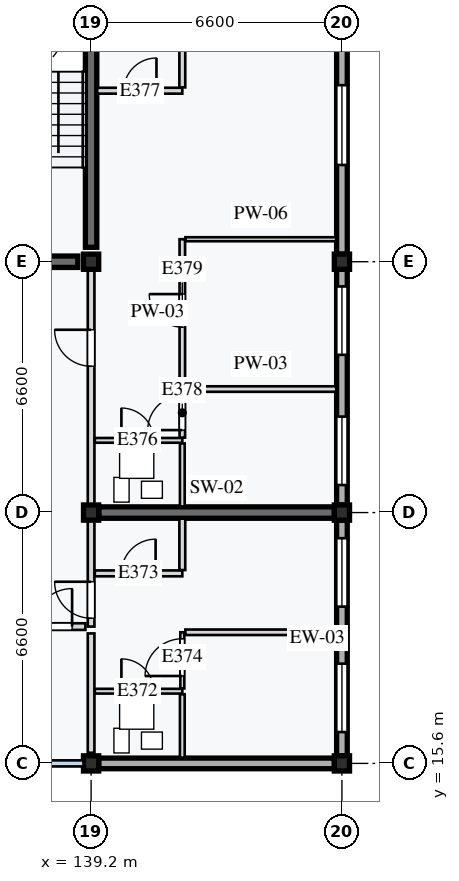
"""IFC4 building model, lengths in metres.
Left out: names, types, materials, properties, quantities, classifications, styles, units other than length and angle.
Written with IfcOpenShell. Run it as: python <this file> out.ifc"""

import sys

from ifc_helpers import new_model, si_unit, direction, frame, frame_2d, origin, origin_2d, place, context, subcontext, project, spatial, rectangle, extrude, element, fill, save


model = new_model("IFC4")
c1 = context("Model", 3, precision=1e-05, world=origin(), true_north=direction((0.0, 1.0)))
c2 = subcontext(c1, "Body", "Model", "MODEL_VIEW")
j1 = project(units=[si_unit("LENGTHUNIT", "METRE"), si_unit("PLANEANGLEUNIT", "RADIAN")], contexts=[c1])
p1 = place(None, origin())
s1 = spatial("IfcSite", under=j1, at=p1, CompositionType="ELEMENT")
p2 = place(p1, origin())
s2 = spatial("IfcBuilding", under=s1, at=p2, CompositionType="ELEMENT")
p3 = place(p2, frame((0.0, 0.0, 30.8)))
s3 = spatial("IfcBuildingStorey", under=s2, at=p3, CompositionType="ELEMENT", Elevation=30.8)
for number, where, z_axis, x_axis in (
    (1, (139.2, 15.6, 0.0), (0.0, 0.0, 1.0), (1.0, 0.0, 0.0)),
    (2, (145.8, 15.6, 0.0), (0.0, 0.0, 1.0), (1.0, 0.0, 0.0)),
    (3, (139.2, 22.2, 0.0), (0.0, 0.0, 1.0), (1.0, 0.0, 0.0)),
    (4, (145.8, 22.2, 0.0), (0.0, 0.0, 1.0), (1.0, 0.0, 0.0)),
    (5, (139.2, 28.8, 0.0), (0.0, 0.0, 1.0), (1.0, 0.0, 0.0)),
    (6, (145.8, 28.8, 0.0), (0.0, 0.0, 1.0), (1.0, 0.0, 0.0)),
):
    element("IfcColumn", number, at=place(p3, frame(where, z_axis=z_axis, x_axis=x_axis)), inside=s3, PredefinedType="COLUMN", context=c2, shape_type="SweptSolid", body=[
        extrude(rectangle(XDim=0.4, YDim=0.4, at=origin_2d()), origin(), (0.0, 0.0, 1.0), 3.2),
    ])
p4 = place(p3, frame((139.2, 29.18, 0.0), z_axis=(0.0, 0.0, 1.0), x_axis=(0.0, 1.0, 0.0)))
e7 = element("IfcWall", 7, at=p4, inside=s3, PredefinedType="SHEAR", context=c2, shape_type="SweptSolid", body=[
    extrude(rectangle(XDim=5.84, YDim=0.3, at=frame_2d((2.92, 0.0))), origin(), (0.0, 0.0, 1.0), 2.97),
])
p5 = place(p3, frame((136.05, 28.8, 0.0), z_axis=(0.0, 0.0, 1.0), x_axis=(1.0, 0.0, 0.0)))
e8 = element("IfcWall", 8, at=p5, inside=s3, PredefinedType="SHEAR", context=c2, shape_type="SweptSolid", body=[
    extrude(rectangle(XDim=2.8, YDim=0.3, at=frame_2d((1.4, 0.0))), origin(), (0.0, 0.0, 1.0), 2.97),
])
p6 = place(p3, frame((139.4, 22.2, 0.0), z_axis=(0.0, 0.0, 1.0), x_axis=(1.0, 0.0, 0.0)))
e9 = element("IfcWall", 9, at=p6, inside=s3, PredefinedType="SHEAR", context=c2, shape_type="SweptSolid", body=[
    extrude(rectangle(XDim=6.2, YDim=0.3, at=frame_2d((3.1, 0.0))), origin(), (0.0, 0.0, 1.0), 2.97),
])
p7 = place(p3, frame((145.8, 15.8, 0.0), z_axis=(0.0, 0.0, 1.0), x_axis=(0.0, 1.0, 0.0)))
e10 = element("IfcWall", 10, at=p7, inside=s3, PredefinedType="STANDARD", context=c2, shape_type="SweptSolid", body=[
    extrude(rectangle(XDim=6.2, YDim=0.28, at=frame_2d((3.1, 0.0))), origin(), (0.0, 0.0, 1.0), 2.6),
])
p8 = place(p7, frame((0.625, 0.0, 0.85)))
e11 = element("IfcOpeningElement", 11, at=p8, cuts=e10, PredefinedType="OPENING", context=c2, shape_type="SweptSolid", body=[
    extrude(rectangle(XDim=1.8, YDim=1.35, at=frame_2d((0.9, 0.675))), frame((0.0, 0.15, 0.0), z_axis=(0.0, -1.0, 0.0), x_axis=(1.0, 0.0, 0.0)), (0.0, 0.0, 1.0), 0.3),
])
p9 = place(p7, frame((3.925, 0.0, 0.85)))
e12 = element("IfcOpeningElement", 12, at=p9, cuts=e10, PredefinedType="OPENING", context=c2, shape_type="SweptSolid", body=[
    extrude(rectangle(XDim=1.8, YDim=1.55, at=frame_2d((0.9, 0.775))), frame((0.0, 0.15, 0.0), z_axis=(0.0, -1.0, 0.0), x_axis=(1.0, 0.0, 0.0)), (0.0, 0.0, 1.0), 0.3),
])
p10 = place(p3, frame((145.8, 22.4, 0.0), z_axis=(0.0, 0.0, 1.0), x_axis=(0.0, 1.0, 0.0)))
e13 = element("IfcWall", 13, at=p10, inside=s3, PredefinedType="STANDARD", context=c2, shape_type="SweptSolid", body=[
    extrude(rectangle(XDim=6.2, YDim=0.28, at=frame_2d((3.1, 0.0))), origin(), (0.0, 0.0, 1.0), 2.6),
])
p11 = place(p10, frame((0.525, 0.0, 0.85)))
e14 = element("IfcOpeningElement", 14, at=p11, cuts=e13, PredefinedType="OPENING", context=c2, shape_type="SweptSolid", body=[
    extrude(rectangle(XDim=1.8, YDim=1.35, at=frame_2d((0.9, 0.675))), frame((0.0, 0.15, 0.0), z_axis=(0.0, -1.0, 0.0), x_axis=(1.0, 0.0, 0.0)), (0.0, 0.0, 1.0), 0.3),
])
p12 = place(p10, frame((3.95, 0.0, 0.85)))
e15 = element("IfcOpeningElement", 15, at=p12, cuts=e13, PredefinedType="OPENING", context=c2, shape_type="SweptSolid", body=[
    extrude(rectangle(XDim=1.8, YDim=1.35, at=frame_2d((0.9, 0.675))), frame((0.0, 0.15, 0.0), z_axis=(0.0, -1.0, 0.0), x_axis=(1.0, 0.0, 0.0)), (0.0, 0.0, 1.0), 0.3),
])
p13 = place(p3, frame((145.8, 29.0, 0.0), z_axis=(0.0, 0.0, 1.0), x_axis=(0.0, 1.0, 0.0)))
e16 = element("IfcWall", 16, at=p13, inside=s3, PredefinedType="STANDARD", context=c2, shape_type="SweptSolid", body=[
    extrude(rectangle(XDim=6.2, YDim=0.28, at=frame_2d((3.1, 0.0))), origin(), (0.0, 0.0, 1.0), 2.6),
])
p14 = place(p13, frame((2.346, 0.0, 0.85)))
e17 = element("IfcOpeningElement", 17, at=p14, cuts=e16, PredefinedType="OPENING", context=c2, shape_type="SweptSolid", body=[
    extrude(rectangle(XDim=2.1, YDim=1.55, at=frame_2d((1.05, 0.775))), frame((0.0, 0.15, 0.0), z_axis=(0.0, -1.0, 0.0), x_axis=(1.0, 0.0, 0.0)), (0.0, 0.0, 1.0), 0.3),
])
p15 = place(p3, frame((139.4, 15.6, 0.0), z_axis=(0.0, 0.0, 1.0), x_axis=(1.0, 0.0, 0.0)))
e18 = element("IfcWall", 18, at=p15, inside=s3, PredefinedType="STANDARD", context=c2, shape_type="SweptSolid", body=[
    extrude(rectangle(XDim=6.2, YDim=0.28, at=frame_2d((3.1, 0.0))), origin(), (0.0, 0.0, 1.0), 2.65),
])
p16 = place(p3, frame((136.05, 19.2, 0.0), z_axis=(0.0, 0.0, 1.0), x_axis=(1.0, 0.0, 0.0)))
e19 = element("IfcWall", 19, at=p16, inside=s3, PredefinedType="PARTITIONING", context=c2, shape_type="SweptSolid", body=[
    extrude(rectangle(XDim=3.0, YDim=0.175, at=frame_2d((1.5, 0.0))), origin(), (0.0, 0.0, 1.0), 2.97),
])
p17 = place(p16, frame((1.65, 0.0, 0.0)))
e20 = element("IfcOpeningElement", 20, at=p17, cuts=e19, PredefinedType="OPENING", context=c2, shape_type="SweptSolid", body=[
    extrude(rectangle(XDim=1.0, YDim=2.16, at=frame_2d((0.5, 1.08))), frame((0.0, 0.097, 0.0), z_axis=(0.0, -1.0, 0.0), x_axis=(1.0, 0.0, 0.0)), (0.0, 0.0, 1.0), 0.195),
])
p18 = place(p3, frame((139.2, 15.88, 0.0), z_axis=(0.0, 0.0, 1.0), x_axis=(0.0, 1.0, 0.0)))
e21 = element("IfcWall", 21, at=p18, inside=s3, PredefinedType="PARTITIONING", context=c2, shape_type="SweptSolid", body=[
    extrude(rectangle(XDim=3.14, YDim=0.175, at=frame_2d((1.57, 0.0))), origin(), (0.0, 0.0, 1.0), 2.55),
])
p19 = place(p3, frame((139.2, 19.2, 0.0), z_axis=(0.0, 0.0, 1.0), x_axis=(0.0, 1.0, 0.0)))
e22 = element("IfcWall", 22, at=p19, inside=s3, PredefinedType="PARTITIONING", context=c2, shape_type="SweptSolid", body=[
    extrude(rectangle(XDim=3.0, YDim=0.175, at=frame_2d((1.5, 0.0))), origin(), (0.0, 0.0, 1.0), 2.55),
])
p20 = place(p19, frame((0.22, 0.0, 0.0)))
e23 = element("IfcOpeningElement", 23, at=p20, cuts=e22, PredefinedType="OPENING", context=c2, shape_type="SweptSolid", body=[
    extrude(rectangle(XDim=0.96, YDim=2.18, at=frame_2d((0.48, 1.09))), frame((0.0, 0.097, 0.0), z_axis=(0.0, -1.0, 0.0), x_axis=(1.0, 0.0, 0.0)), (0.0, 0.0, 1.0), 0.195),
])
p21 = place(p3, frame((139.298, 17.5, 0.0), z_axis=(0.0, 0.0, 1.0), x_axis=(1.0, 0.0, 0.0)))
e24 = element("IfcWall", 24, at=p21, inside=s3, PredefinedType="PARTITIONING", context=c2, shape_type="SweptSolid", body=[
    extrude(rectangle(XDim=2.302, YDim=0.125, at=frame_2d((1.151, 0.0))), origin(), (0.0, 0.0, 1.0), 2.97),
])
p22 = place(p21, frame((0.7, 0.0, 0.0)))
e25 = element("IfcOpeningElement", 25, at=p22, cuts=e24, PredefinedType="OPENING", context=c2, shape_type="SweptSolid", body=[
    extrude(rectangle(XDim=0.85, YDim=2.04, at=frame_2d((0.425, 1.02))), frame((0.0, 0.073, 0.0), z_axis=(0.0, -1.0, 0.0), x_axis=(1.0, 0.0, 0.0)), (0.0, 0.0, 1.0), 0.145),
])
p23 = place(p3, frame((141.6, 15.75, 0.0), z_axis=(0.0, 0.0, 1.0), x_axis=(0.0, 1.0, 0.0)))
e26 = element("IfcWall", 26, at=p23, inside=s3, PredefinedType="PARTITIONING", context=c2, shape_type="SweptSolid", body=[
    extrude(rectangle(XDim=1.67, YDim=0.125, at=frame_2d((0.835, 0.0))), origin(), (0.0, 0.0, 1.0), 2.97),
])
p24 = place(p3, frame((139.298, 20.6, 0.0), z_axis=(0.0, 0.0, 1.0), x_axis=(1.0, 0.0, 0.0)))
e27 = element("IfcWall", 27, at=p24, inside=s3, PredefinedType="PARTITIONING", context=c2, shape_type="SweptSolid", body=[
    extrude(rectangle(XDim=2.302, YDim=0.155, at=frame_2d((1.151, 0.0))), origin(), (0.0, 0.0, 1.0), 2.97),
])
p25 = place(p24, frame((0.7, 0.0, 0.0)))
e28 = element("IfcOpeningElement", 28, at=p25, cuts=e27, PredefinedType="OPENING", context=c2, shape_type="SweptSolid", body=[
    extrude(rectangle(XDim=0.9, YDim=2.16, at=frame_2d((0.45, 1.08))), frame((0.0, 0.087, 0.0), z_axis=(0.0, -1.0, 0.0), x_axis=(1.0, 0.0, 0.0)), (0.0, 0.0, 1.0), 0.175),
])
p26 = place(p3, frame((141.6, 20.688, 0.0), z_axis=(0.0, 0.0, 1.0), x_axis=(0.0, 1.0, 0.0)))
e29 = element("IfcWall", 29, at=p26, inside=s3, PredefinedType="PARTITIONING", context=c2, shape_type="SweptSolid", body=[
    extrude(rectangle(XDim=1.353, YDim=0.155, at=frame_2d((0.676, 0.0))), origin(), (0.0, 0.0, 1.0), 2.97),
])
p27 = place(p3, frame((141.6, 17.573, 0.0), z_axis=(0.0, 0.0, 1.0), x_axis=(0.0, 1.0, 0.0)))
e30 = element("IfcWall", 30, at=p27, inside=s3, PredefinedType="PARTITIONING", context=c2, shape_type="SweptSolid", body=[
    extrude(rectangle(XDim=1.478, YDim=0.105, at=frame_2d((0.739, 0.0))), origin(), (0.0, 0.0, 1.0), 2.97),
])
p28 = place(p27, frame((0.327, 0.0, 0.0)))
e31 = element("IfcOpeningElement", 31, at=p28, cuts=e30, PredefinedType="OPENING", context=c2, shape_type="SweptSolid", body=[
    extrude(rectangle(XDim=0.98, YDim=2.12, at=frame_2d((0.49, 1.06))), frame((0.0, 0.062, 0.0), z_axis=(0.0, -1.0, 0.0), x_axis=(1.0, 0.0, 0.0)), (0.0, 0.0, 1.0), 0.125),
])
p29 = place(p3, frame((141.68, 19.05, 0.0), z_axis=(0.0, 0.0, 1.0), x_axis=(1.0, 0.0, 0.0)))
e32 = element("IfcWall", 32, at=p29, inside=s3, PredefinedType="PARTITIONING", context=c2, shape_type="SweptSolid", body=[
    extrude(rectangle(XDim=3.97, YDim=0.145, at=frame_2d((1.985, 0.0))), origin(), (0.0, 0.0, 1.0), 2.97),
])
p30 = place(p3, frame((139.2, 22.2, 0.0), z_axis=(0.0, 0.0, 1.0), x_axis=(0.0, 1.0, 0.0)))
e33 = element("IfcWall", 33, at=p30, inside=s3, PredefinedType="PARTITIONING", context=c2, shape_type="SweptSolid", body=[
    extrude(rectangle(XDim=6.6, YDim=0.175, at=frame_2d((3.3, 0.0))), origin(), (0.0, 0.0, 1.0), 2.55),
])
p31 = place(p30, frame((3.85, 0.0, 0.0)))
e34 = element("IfcOpeningElement", 34, at=p31, cuts=e33, PredefinedType="OPENING", context=c2, shape_type="SweptSolid", body=[
    extrude(rectangle(XDim=0.96, YDim=2.18, at=frame_2d((0.48, 1.09))), frame((0.0, 0.097, 0.0), z_axis=(0.0, -1.0, 0.0), x_axis=(1.0, 0.0, 0.0)), (0.0, 0.0, 1.0), 0.195),
])
p32 = place(p3, frame((139.298, 24.1, 0.0), z_axis=(0.0, 0.0, 1.0), x_axis=(1.0, 0.0, 0.0)))
e35 = element("IfcWall", 35, at=p32, inside=s3, PredefinedType="PARTITIONING", context=c2, shape_type="SweptSolid", body=[
    extrude(rectangle(XDim=2.302, YDim=0.125, at=frame_2d((1.151, 0.0))), origin(), (0.0, 0.0, 1.0), 2.97),
])
p33 = place(p32, frame((0.7, 0.0, 0.0)))
e36 = element("IfcOpeningElement", 36, at=p33, cuts=e35, PredefinedType="OPENING", context=c2, shape_type="SweptSolid", body=[
    extrude(rectangle(XDim=0.85, YDim=2.04, at=frame_2d((0.425, 1.02))), frame((0.0, 0.073, 0.0), z_axis=(0.0, -1.0, 0.0), x_axis=(1.0, 0.0, 0.0)), (0.0, 0.0, 1.0), 0.145),
])
p34 = place(p3, frame((141.6, 22.36, 0.0), z_axis=(0.0, 0.0, 1.0), x_axis=(0.0, 1.0, 0.0)))
e37 = element("IfcWall", 37, at=p34, inside=s3, PredefinedType="PARTITIONING", context=c2, shape_type="SweptSolid", body=[
    extrude(rectangle(XDim=1.66, YDim=0.125, at=frame_2d((0.83, 0.0))), origin(), (0.0, 0.0, 1.0), 2.97),
])
p35 = place(p3, frame((139.36, 33.3, 0.0), z_axis=(0.0, 0.0, 1.0), x_axis=(1.0, 0.0, 0.0)))
e38 = element("IfcWall", 38, at=p35, inside=s3, PredefinedType="PARTITIONING", context=c2, shape_type="SweptSolid", body=[
    extrude(rectangle(XDim=2.24, YDim=0.155, at=frame_2d((1.12, 0.0))), origin(), (0.0, 0.0, 1.0), 2.97),
])
p36 = place(p35, frame((0.7, 0.0, 0.0)))
e39 = element("IfcOpeningElement", 39, at=p36, cuts=e38, PredefinedType="OPENING", context=c2, shape_type="SweptSolid", body=[
    extrude(rectangle(XDim=0.86, YDim=2.12, at=frame_2d((0.43, 1.06))), frame((0.0, 0.087, 0.0), z_axis=(0.0, -1.0, 0.0), x_axis=(1.0, 0.0, 0.0)), (0.0, 0.0, 1.0), 0.175),
])
p37 = place(p3, frame((141.6, 33.387, 0.0), z_axis=(0.0, 0.0, 1.0), x_axis=(0.0, 1.0, 0.0)))
e40 = element("IfcWall", 40, at=p37, inside=s3, PredefinedType="PARTITIONING", context=c2, shape_type="SweptSolid", body=[
    extrude(rectangle(XDim=1.853, YDim=0.155, at=frame_2d((0.926, 0.0))), origin(), (0.0, 0.0, 1.0), 2.97),
])
p38 = place(p3, frame((141.6, 24.173, 0.0), z_axis=(0.0, 0.0, 1.0), x_axis=(0.0, 1.0, 0.0)))
e41 = element("IfcWall", 41, at=p38, inside=s3, PredefinedType="PARTITIONING", context=c2, shape_type="SweptSolid", body=[
    extrude(rectangle(XDim=1.277, YDim=0.145, at=frame_2d((0.639, 0.0))), origin(), (0.0, 0.0, 1.0), 2.97),
])
p39 = place(p38, frame((0.198, 0.0, 0.0)))
e42 = element("IfcOpeningElement", 42, at=p39, cuts=e41, PredefinedType="OPENING", context=c2, shape_type="SweptSolid", body=[
    extrude(rectangle(XDim=0.91, YDim=2.14, at=frame_2d((0.455, 1.07))), frame((0.0, 0.083, 0.0), z_axis=(0.0, -1.0, 0.0), x_axis=(1.0, 0.0, 0.0)), (0.0, 0.0, 1.0), 0.165),
])
p40 = place(p3, frame((141.683, 25.45, 0.0), z_axis=(0.0, 0.0, 1.0), x_axis=(1.0, 0.0, 0.0)))
e43 = element("IfcWall", 43, at=p40, inside=s3, PredefinedType="PARTITIONING", context=c2, shape_type="SweptSolid", body=[
    extrude(rectangle(XDim=3.967, YDim=0.145, at=frame_2d((1.984, 0.0))), origin(), (0.0, 0.0, 1.0), 2.97),
])
p41 = place(p3, frame((141.6, 25.532, 0.0), z_axis=(0.0, 0.0, 1.0), x_axis=(0.0, 1.0, 0.0)))
e44 = element("IfcWall", 44, at=p41, inside=s3, PredefinedType="PARTITIONING", context=c2, shape_type="SweptSolid", body=[
    extrude(rectangle(XDim=3.86, YDim=0.145, at=frame_2d((1.93, 0.0))), origin(), (0.0, 0.0, 1.0), 2.97),
])
p42 = place(p41, frame((1.546, 0.0, 0.0)))
e45 = element("IfcOpeningElement", 45, at=p42, cuts=e44, PredefinedType="OPENING", context=c2, shape_type="SweptSolid", body=[
    extrude(rectangle(XDim=0.87, YDim=2.08, at=frame_2d((0.435, 1.04))), frame((0.0, 0.083, 0.0), z_axis=(0.0, -1.0, 0.0), x_axis=(1.0, 0.0, 0.0)), (0.0, 0.0, 1.0), 0.165),
])
p43 = place(p3, frame((141.683, 29.392, 0.0), z_axis=(0.0, 0.0, 1.0), x_axis=(1.0, 0.0, 0.0)))
e46 = element("IfcWall", 46, at=p43, inside=s3, PredefinedType="PARTITIONING", context=c2, shape_type="SweptSolid", body=[
    extrude(rectangle(XDim=3.967, YDim=0.105, at=frame_2d((1.984, 0.0))), origin(), (0.0, 0.0, 1.0), 2.97),
])
p44 = place(p8, origin())
e47 = element("IfcWindow", 47, at=p44, inside=s3, PartitioningType="SINGLE_PANEL", PredefinedType="WINDOW", context=c2, shape_type="SweptSolid", body=[
    extrude(rectangle(XDim=1.8, YDim=1.35, at=frame_2d((0.9, 0.675))), frame((0.0, 0.03, 0.0), z_axis=(0.0, -1.0, 0.0), x_axis=(1.0, 0.0, 0.0)), (0.0, 0.0, 1.0), 0.06),
])
fill(e11, e47)
p45 = place(p9, origin())
e48 = element("IfcWindow", 48, at=p45, inside=s3, PartitioningType="SINGLE_PANEL", PredefinedType="WINDOW", context=c2, shape_type="SweptSolid", body=[
    extrude(rectangle(XDim=1.8, YDim=1.55, at=frame_2d((0.9, 0.775))), frame((0.0, 0.03, 0.0), z_axis=(0.0, -1.0, 0.0), x_axis=(1.0, 0.0, 0.0)), (0.0, 0.0, 1.0), 0.06),
])
fill(e12, e48)
p46 = place(p11, origin())
e49 = element("IfcWindow", 49, at=p46, inside=s3, PartitioningType="SINGLE_PANEL", PredefinedType="WINDOW", context=c2, shape_type="SweptSolid", body=[
    extrude(rectangle(XDim=1.8, YDim=1.35, at=frame_2d((0.9, 0.675))), frame((0.0, 0.03, 0.0), z_axis=(0.0, -1.0, 0.0), x_axis=(1.0, 0.0, 0.0)), (0.0, 0.0, 1.0), 0.06),
])
fill(e14, e49)
p47 = place(p12, origin())
e50 = element("IfcWindow", 50, at=p47, inside=s3, PartitioningType="SINGLE_PANEL", PredefinedType="WINDOW", context=c2, shape_type="SweptSolid", body=[
    extrude(rectangle(XDim=1.8, YDim=1.35, at=frame_2d((0.9, 0.675))), frame((0.0, 0.03, 0.0), z_axis=(0.0, -1.0, 0.0), x_axis=(1.0, 0.0, 0.0)), (0.0, 0.0, 1.0), 0.06),
])
fill(e15, e50)
p48 = place(p14, origin())
e51 = element("IfcWindow", 51, at=p48, inside=s3, PartitioningType="SINGLE_PANEL", PredefinedType="WINDOW", context=c2, shape_type="SweptSolid", body=[
    extrude(rectangle(XDim=2.1, YDim=1.55, at=frame_2d((1.05, 0.775))), frame((0.0, 0.03, 0.0), z_axis=(0.0, -1.0, 0.0), x_axis=(1.0, 0.0, 0.0)), (0.0, 0.0, 1.0), 0.06),
])
fill(e17, e51)
p49 = place(p17, origin())
e52 = element("IfcDoor", 52, at=p49, inside=s3, OperationType="SINGLE_SWING_RIGHT", PredefinedType="DOOR", context=c2, shape_type="SweptSolid", body=[
    extrude(rectangle(XDim=1.0, YDim=2.16, at=frame_2d((0.5, 1.08))), frame((0.0, 0.025, 0.0), z_axis=(0.0, -1.0, 0.0), x_axis=(1.0, 0.0, 0.0)), (0.0, 0.0, 1.0), 0.05),
])
fill(e20, e52)
p50 = place(p20, origin())
e53 = element("IfcDoor", 53, at=p50, inside=s3, OperationType="SINGLE_SWING_RIGHT", PredefinedType="DOOR", context=c2, shape_type="SweptSolid", body=[
    extrude(rectangle(XDim=0.96, YDim=2.18, at=frame_2d((0.48, 1.09))), frame((0.0, 0.025, 0.0), z_axis=(0.0, -1.0, 0.0), x_axis=(1.0, 0.0, 0.0)), (0.0, 0.0, 1.0), 0.05),
])
fill(e23, e53)
p51 = place(p22, origin())
e54 = element("IfcDoor", 54, at=p51, inside=s3, OperationType="SINGLE_SWING_LEFT", PredefinedType="DOOR", context=c2, shape_type="SweptSolid", body=[
    extrude(rectangle(XDim=0.85, YDim=2.04, at=frame_2d((0.425, 1.02))), frame((0.0, 0.025, 0.0), z_axis=(0.0, -1.0, 0.0), x_axis=(1.0, 0.0, 0.0)), (0.0, 0.0, 1.0), 0.05),
])
fill(e25, e54)
p52 = place(p25, origin())
e55 = element("IfcDoor", 55, at=p52, inside=s3, OperationType="SINGLE_SWING_RIGHT", PredefinedType="DOOR", context=c2, shape_type="SweptSolid", body=[
    extrude(rectangle(XDim=0.9, YDim=2.16, at=frame_2d((0.45, 1.08))), frame((0.0, 0.025, 0.0), z_axis=(0.0, -1.0, 0.0), x_axis=(1.0, 0.0, 0.0)), (0.0, 0.0, 1.0), 0.05),
])
fill(e28, e55)
p53 = place(p28, origin())
e56 = element("IfcDoor", 56, at=p53, inside=s3, OperationType="SINGLE_SWING_LEFT", PredefinedType="DOOR", context=c2, shape_type="SweptSolid", body=[
    extrude(rectangle(XDim=0.98, YDim=2.12, at=frame_2d((0.49, 1.06))), frame((0.0, 0.025, 0.0), z_axis=(0.0, -1.0, 0.0), x_axis=(1.0, 0.0, 0.0)), (0.0, 0.0, 1.0), 0.05),
])
fill(e31, e56)
p54 = place(p31, origin())
e57 = element("IfcDoor", 57, at=p54, inside=s3, OperationType="SINGLE_SWING_RIGHT", PredefinedType="DOOR", context=c2, shape_type="SweptSolid", body=[
    extrude(rectangle(XDim=0.96, YDim=2.18, at=frame_2d((0.48, 1.09))), frame((0.0, 0.025, 0.0), z_axis=(0.0, -1.0, 0.0), x_axis=(1.0, 0.0, 0.0)), (0.0, 0.0, 1.0), 0.05),
])
fill(e34, e57)
p55 = place(p33, origin())
e58 = element("IfcDoor", 58, at=p55, inside=s3, OperationType="SINGLE_SWING_LEFT", PredefinedType="DOOR", context=c2, shape_type="SweptSolid", body=[
    extrude(rectangle(XDim=0.85, YDim=2.04, at=frame_2d((0.425, 1.02))), frame((0.0, 0.025, 0.0), z_axis=(0.0, -1.0, 0.0), x_axis=(1.0, 0.0, 0.0)), (0.0, 0.0, 1.0), 0.05),
])
fill(e36, e58)
p56 = place(p36, origin())
e59 = element("IfcDoor", 59, at=p56, inside=s3, OperationType="SINGLE_SWING_RIGHT", PredefinedType="DOOR", context=c2, shape_type="SweptSolid", body=[
    extrude(rectangle(XDim=0.86, YDim=2.12, at=frame_2d((0.43, 1.06))), frame((0.0, 0.025, 0.0), z_axis=(0.0, -1.0, 0.0), x_axis=(1.0, 0.0, 0.0)), (0.0, 0.0, 1.0), 0.05),
])
fill(e39, e59)
p57 = place(p39, origin())
e60 = element("IfcDoor", 60, at=p57, inside=s3, OperationType="SINGLE_SWING_LEFT", PredefinedType="DOOR", context=c2, shape_type="SweptSolid", body=[
    extrude(rectangle(XDim=0.91, YDim=2.14, at=frame_2d((0.455, 1.07))), frame((0.0, 0.025, 0.0), z_axis=(0.0, -1.0, 0.0), x_axis=(1.0, 0.0, 0.0)), (0.0, 0.0, 1.0), 0.05),
])
fill(e42, e60)
p58 = place(p42, origin())
e61 = element("IfcDoor", 61, at=p58, inside=s3, OperationType="SINGLE_SWING_RIGHT", PredefinedType="DOOR", context=c2, shape_type="SweptSolid", body=[
    extrude(rectangle(XDim=0.87, YDim=2.08, at=frame_2d((0.435, 1.04))), frame((0.0, 0.025, 0.0), z_axis=(0.0, -1.0, 0.0), x_axis=(1.0, 0.0, 0.0)), (0.0, 0.0, 1.0), 0.05),
])
fill(e45, e61)
save(model, sys.argv[1])
